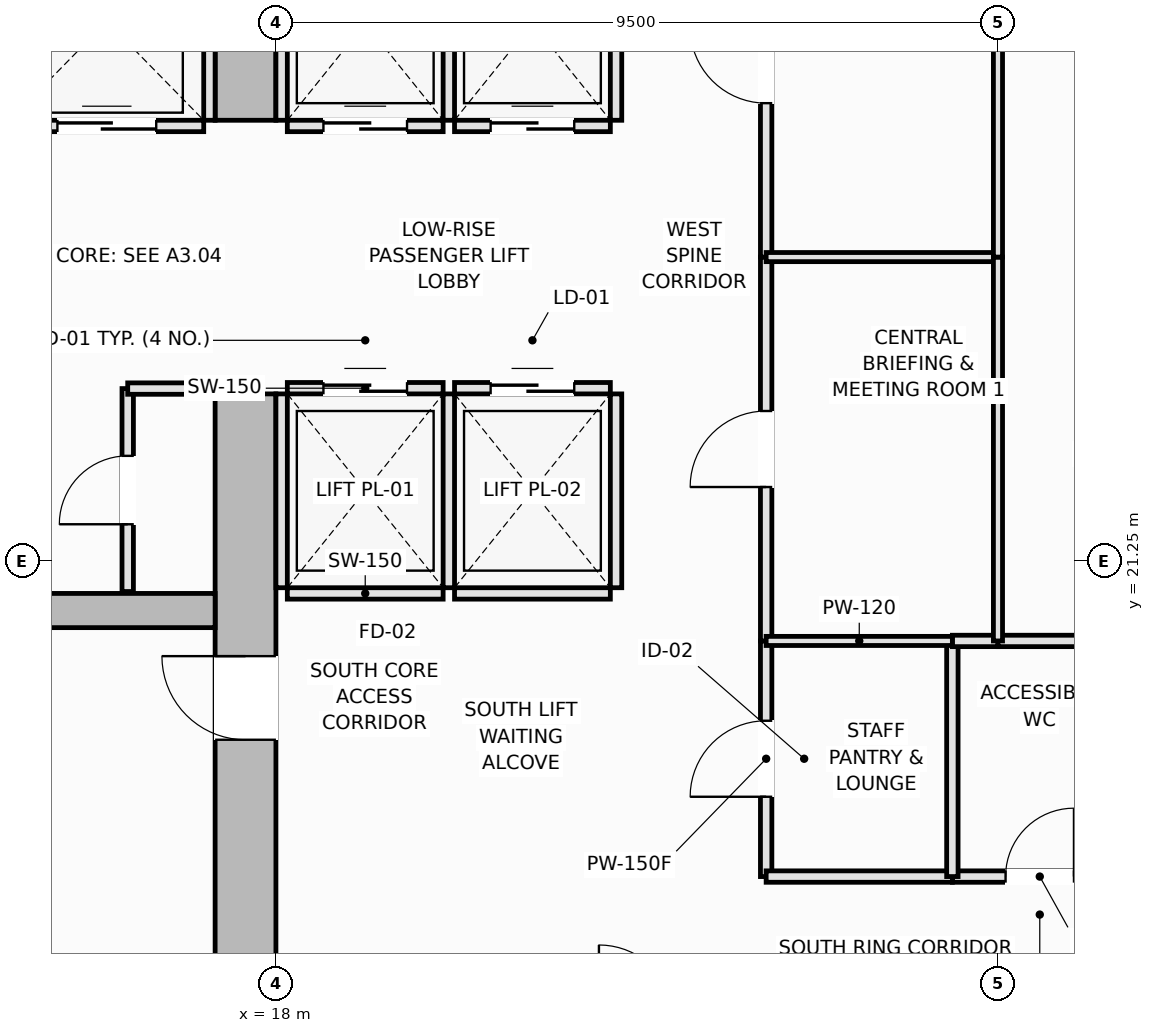
"""IFC4 building model, lengths in metres.
Left out: names, types, materials, properties, quantities, classifications, styles, units other than length and angle.
Written with IfcOpenShell. Run it as: python <this file> out.ifc"""

import sys

from ifc_helpers import new_model, si_unit, direction, frame, frame_2d, origin, place, context, subcontext, project, spatial, rectangle, extrude, element, fill, save


model = new_model("IFC4")
c1 = context("Model", 3, precision=1e-05, world=origin(), true_north=direction((0.0, 1.0)))
c2 = subcontext(c1, "Body", "Model", "MODEL_VIEW")
j1 = project(units=[si_unit("LENGTHUNIT", "METRE"), si_unit("PLANEANGLEUNIT", "RADIAN")], contexts=[c1])
p1 = place(None, origin())
s1 = spatial("IfcSite", under=j1, at=p1, CompositionType="ELEMENT")
p2 = place(p1, origin())
s2 = spatial("IfcBuilding", under=s1, at=p2, CompositionType="ELEMENT")
p3 = place(p2, frame((0.0, 0.0, 36.25)))
s3 = spatial("IfcBuildingStorey", under=s2, at=p3, CompositionType="ELEMENT", Elevation=36.25)
p4 = place(p3, frame((17.6, 14.8, 0.0), z_axis=(0.0, 0.0, 1.0), x_axis=(0.0, 1.0, 0.0)))
e1 = element("IfcWall", 1, at=p4, inside=s3, PredefinedType="SHEAR", context=c2, shape_type="SweptSolid", body=[
    extrude(rectangle(XDim=8.65, YDim=0.8, at=frame_2d((4.325, 0.0))), origin(), (0.0, 0.0, 1.0), 3.55),
])
p5 = place(p4, frame((4.1, 0.0, 0.0)))
e2 = element("IfcOpeningElement", 2, at=p5, cuts=e1, PredefinedType="OPENING", context=c2, shape_type="SweptSolid", body=[
    extrude(rectangle(XDim=1.1, YDim=2.15, at=frame_2d((0.55, 1.075))), frame((0.0, 0.41, 0.0), z_axis=(0.0, -1.0, 0.0), x_axis=(1.0, 0.0, 0.0)), (0.0, 0.0, 1.0), 0.82),
])
p6 = place(p3, frame((17.6, 27.05, 0.0), z_axis=(0.0, 0.0, 1.0), x_axis=(0.0, 1.0, 0.0)))
e3 = element("IfcWall", 3, at=p6, inside=s3, PredefinedType="SHEAR", context=c2, shape_type="SweptSolid", body=[
    extrude(rectangle(XDim=8.65, YDim=0.8, at=frame_2d((4.325, 0.0))), origin(), (0.0, 0.0, 1.0), 3.55),
])
p7 = place(p6, frame((3.45, 0.0, 0.0)))
e4 = element("IfcOpeningElement", 4, at=p7, cuts=e3, PredefinedType="OPENING", context=c2, shape_type="SweptSolid", body=[
    extrude(rectangle(XDim=1.1, YDim=2.15, at=frame_2d((0.55, 1.075))), frame((0.0, 0.41, 0.0), z_axis=(0.0, -1.0, 0.0), x_axis=(1.0, 0.0, 0.0)), (0.0, 0.0, 1.0), 0.82),
])
p8 = place(p3, frame((5.3, 20.6, 0.0), z_axis=(0.0, 0.0, 1.0), x_axis=(1.0, 0.0, 0.0)))
e5 = element("IfcWall", 5, at=p8, inside=s3, PredefinedType="SHEAR", context=c2, shape_type="SweptSolid", body=[
    extrude(rectangle(XDim=11.9, YDim=0.45, at=frame_2d((5.95, 0.0))), origin(), (0.0, 0.0, 1.0), 3.55),
])
p9 = place(p3, frame((18.15, 20.825, 0.0), z_axis=(0.0, 0.0, 1.0), x_axis=(1.0, 0.0, 0.0)))
e6 = element("IfcWall", 6, at=p9, inside=s3, PredefinedType="PARTITIONING", context=c2, shape_type="SweptSolid", body=[
    extrude(rectangle(XDim=2.05, YDim=0.15, at=frame_2d((1.025, 0.0))), origin(), (0.0, 0.0, 1.0), 3.37),
])
p10 = place(p3, frame((18.15, 23.525, 0.0), z_axis=(0.0, 0.0, 1.0), x_axis=(1.0, 0.0, 0.0)))
e7 = element("IfcWall", 7, at=p10, inside=s3, PredefinedType="PARTITIONING", context=c2, shape_type="SweptSolid", body=[
    extrude(rectangle(XDim=2.05, YDim=0.15, at=frame_2d((1.025, 0.0))), origin(), (0.0, 0.0, 1.0), 3.37),
])
p11 = place(p10, frame((0.475, 0.0, 0.0)))
e8 = element("IfcOpeningElement", 8, at=p11, cuts=e7, PredefinedType="OPENING", context=c2, shape_type="SweptSolid", body=[
    extrude(rectangle(XDim=1.1, YDim=2.2, at=frame_2d((0.55, 1.1))), frame((0.0, 0.085, 0.0), z_axis=(0.0, -1.0, 0.0), x_axis=(1.0, 0.0, 0.0)), (0.0, 0.0, 1.0), 0.17),
])
for number, where, z_axis, x_axis in (
    (9, (18.075, 20.9, 0.0), (0.0, 0.0, 1.0), (0.0, 1.0, 0.0)),
    (10, (20.275, 20.9, 0.0), (0.0, 0.0, 1.0), (0.0, 1.0, 0.0)),
):
    element("IfcWall", number, at=place(p3, frame(where, z_axis=z_axis, x_axis=x_axis)), inside=s3, PredefinedType="PARTITIONING", context=c2, shape_type="SweptSolid", body=[
        extrude(rectangle(XDim=2.55, YDim=0.15, at=frame_2d((1.275, 0.0))), origin(), (0.0, 0.0, 1.0), 3.37),
    ])
p12 = place(p3, frame((20.35, 20.825, 0.0), z_axis=(0.0, 0.0, 1.0), x_axis=(1.0, 0.0, 0.0)))
e11 = element("IfcWall", 11, at=p12, inside=s3, PredefinedType="PARTITIONING", context=c2, shape_type="SweptSolid", body=[
    extrude(rectangle(XDim=2.05, YDim=0.15, at=frame_2d((1.025, 0.0))), origin(), (0.0, 0.0, 1.0), 3.37),
])
p13 = place(p3, frame((20.35, 23.525, 0.0), z_axis=(0.0, 0.0, 1.0), x_axis=(1.0, 0.0, 0.0)))
e12 = element("IfcWall", 12, at=p13, inside=s3, PredefinedType="PARTITIONING", context=c2, shape_type="SweptSolid", body=[
    extrude(rectangle(XDim=2.05, YDim=0.15, at=frame_2d((1.025, 0.0))), origin(), (0.0, 0.0, 1.0), 3.37),
])
p14 = place(p13, frame((0.475, 0.0, 0.0)))
e13 = element("IfcOpeningElement", 13, at=p14, cuts=e12, PredefinedType="OPENING", context=c2, shape_type="SweptSolid", body=[
    extrude(rectangle(XDim=1.1, YDim=2.2, at=frame_2d((0.55, 1.1))), frame((0.0, 0.085, 0.0), z_axis=(0.0, -1.0, 0.0), x_axis=(1.0, 0.0, 0.0)), (0.0, 0.0, 1.0), 0.17),
])
p15 = place(p3, frame((22.475, 20.9, 0.0), z_axis=(0.0, 0.0, 1.0), x_axis=(0.0, 1.0, 0.0)))
e14 = element("IfcWall", 14, at=p15, inside=s3, PredefinedType="PARTITIONING", context=c2, shape_type="SweptSolid", body=[
    extrude(rectangle(XDim=2.55, YDim=0.15, at=frame_2d((1.275, 0.0))), origin(), (0.0, 0.0, 1.0), 3.37),
])
p16 = place(p3, frame((18.15, 26.975, 0.0), z_axis=(0.0, 0.0, 1.0), x_axis=(1.0, 0.0, 0.0)))
e15 = element("IfcWall", 15, at=p16, inside=s3, PredefinedType="PARTITIONING", context=c2, shape_type="SweptSolid", body=[
    extrude(rectangle(XDim=2.05, YDim=0.15, at=frame_2d((1.025, 0.0))), origin(), (0.0, 0.0, 1.0), 3.37),
])
p17 = place(p16, frame((0.475, 0.0, 0.0)))
e16 = element("IfcOpeningElement", 16, at=p17, cuts=e15, PredefinedType="OPENING", context=c2, shape_type="SweptSolid", body=[
    extrude(rectangle(XDim=1.1, YDim=2.2, at=frame_2d((0.55, 1.1))), frame((0.0, 0.085, 0.0), z_axis=(0.0, -1.0, 0.0), x_axis=(1.0, 0.0, 0.0)), (0.0, 0.0, 1.0), 0.17),
])
for number, where, z_axis, x_axis in (
    (17, (18.075, 27.05, 0.0), (0.0, 0.0, 1.0), (0.0, 1.0, 0.0)),
    (18, (20.275, 27.05, 0.0), (0.0, 0.0, 1.0), (0.0, 1.0, 0.0)),
):
    element("IfcWall", number, at=place(p3, frame(where, z_axis=z_axis, x_axis=x_axis)), inside=s3, PredefinedType="PARTITIONING", context=c2, shape_type="SweptSolid", body=[
        extrude(rectangle(XDim=2.55, YDim=0.15, at=frame_2d((1.275, 0.0))), origin(), (0.0, 0.0, 1.0), 3.37),
    ])
p18 = place(p3, frame((20.35, 26.975, 0.0), z_axis=(0.0, 0.0, 1.0), x_axis=(1.0, 0.0, 0.0)))
e19 = element("IfcWall", 19, at=p18, inside=s3, PredefinedType="PARTITIONING", context=c2, shape_type="SweptSolid", body=[
    extrude(rectangle(XDim=2.05, YDim=0.15, at=frame_2d((1.025, 0.0))), origin(), (0.0, 0.0, 1.0), 3.37),
])
p19 = place(p18, frame((0.475, 0.0, 0.0)))
e20 = element("IfcOpeningElement", 20, at=p19, cuts=e19, PredefinedType="OPENING", context=c2, shape_type="SweptSolid", body=[
    extrude(rectangle(XDim=1.1, YDim=2.2, at=frame_2d((0.55, 1.1))), frame((0.0, 0.085, 0.0), z_axis=(0.0, -1.0, 0.0), x_axis=(1.0, 0.0, 0.0)), (0.0, 0.0, 1.0), 0.17),
])
p20 = place(p3, frame((22.475, 27.05, 0.0), z_axis=(0.0, 0.0, 1.0), x_axis=(0.0, 1.0, 0.0)))
e21 = element("IfcWall", 21, at=p20, inside=s3, PredefinedType="PARTITIONING", context=c2, shape_type="SweptSolid", body=[
    extrude(rectangle(XDim=2.55, YDim=0.15, at=frame_2d((1.275, 0.0))), origin(), (0.0, 0.0, 1.0), 3.37),
])
p21 = place(p3, frame((14.5, 26.975, 0.0), z_axis=(0.0, 0.0, 1.0), x_axis=(1.0, 0.0, 0.0)))
e22 = element("IfcWall", 22, at=p21, inside=s3, PredefinedType="PARTITIONING", context=c2, shape_type="SweptSolid", body=[
    extrude(rectangle(XDim=2.55, YDim=0.15, at=frame_2d((1.275, 0.0))), origin(), (0.0, 0.0, 1.0), 3.37),
])
p22 = place(p21, frame((0.625, 0.0, 0.0)))
e23 = element("IfcOpeningElement", 23, at=p22, cuts=e22, PredefinedType="OPENING", context=c2, shape_type="SweptSolid", body=[
    extrude(rectangle(XDim=1.3, YDim=2.2, at=frame_2d((0.65, 1.1))), frame((0.0, 0.085, 0.0), z_axis=(0.0, -1.0, 0.0), x_axis=(1.0, 0.0, 0.0)), (0.0, 0.0, 1.0), 0.17),
])
p23 = place(p3, frame((17.125, 27.05, 0.0), z_axis=(0.0, 0.0, 1.0), x_axis=(0.0, 1.0, 0.0)))
e24 = element("IfcWall", 24, at=p23, inside=s3, PredefinedType="PARTITIONING", context=c2, shape_type="SweptSolid", body=[
    extrude(rectangle(XDim=2.6, YDim=0.15, at=frame_2d((1.3, 0.0))), origin(), (0.0, 0.0, 1.0), 3.37),
])
p24 = place(p3, frame((16.05, 20.85, 0.0), z_axis=(0.0, 0.0, 1.0), x_axis=(0.0, 1.0, 0.0)))
e25 = element("IfcWall", 25, at=p24, inside=s3, PredefinedType="PARTITIONING", context=c2, shape_type="SweptSolid", body=[
    extrude(rectangle(XDim=2.67, YDim=0.15, at=frame_2d((1.335, 0.0))), origin(), (0.0, 0.0, 1.0), 3.37),
])
p25 = place(p24, frame((0.885, 0.0, 0.0)))
e26 = element("IfcOpeningElement", 26, at=p25, cuts=e25, PredefinedType="OPENING", context=c2, shape_type="SweptSolid", body=[
    extrude(rectangle(XDim=0.9, YDim=2.1, at=frame_2d((0.45, 1.05))), frame((0.0, 0.085, 0.0), z_axis=(0.0, -1.0, 0.0), x_axis=(1.0, 0.0, 0.0)), (0.0, 0.0, 1.0), 0.17),
])
p26 = place(p3, frame((16.05, 23.52, 0.0), z_axis=(0.0, 0.0, 1.0), x_axis=(1.0, 0.0, 0.0)))
e27 = element("IfcWall", 27, at=p26, inside=s3, PredefinedType="PARTITIONING", context=c2, shape_type="SweptSolid", body=[
    extrude(rectangle(XDim=1.17, YDim=0.15, at=frame_2d((0.585, 0.0))), origin(), (0.0, 0.0, 1.0), 3.37),
])
p27 = place(p3, frame((24.45, 17.1, 0.0), z_axis=(0.0, 0.0, 1.0), x_axis=(0.0, 1.0, 0.0)))
e28 = element("IfcWall", 28, at=p27, inside=s3, PredefinedType="PARTITIONING", context=c2, shape_type="SweptSolid", body=[
    extrude(rectangle(XDim=3.1, YDim=0.15, at=frame_2d((1.55, 0.0))), origin(), (0.0, 0.0, 1.0), 3.37),
])
p28 = place(p27, frame((1.05, 0.0, 0.0)))
e29 = element("IfcOpeningElement", 29, at=p28, cuts=e28, PredefinedType="OPENING", context=c2, shape_type="SweptSolid", body=[
    extrude(rectangle(XDim=1.0, YDim=2.15, at=frame_2d((0.5, 1.075))), frame((0.0, 0.085, 0.0), z_axis=(0.0, -1.0, 0.0), x_axis=(1.0, 0.0, 0.0)), (0.0, 0.0, 1.0), 0.17),
])
p29 = place(p3, frame((24.45, 20.2, 0.0), z_axis=(0.0, 0.0, 1.0), x_axis=(0.0, 1.0, 0.0)))
e30 = element("IfcWall", 30, at=p29, inside=s3, PredefinedType="PARTITIONING", context=c2, shape_type="SweptSolid", body=[
    extrude(rectangle(XDim=5.05, YDim=0.15, at=frame_2d((2.525, 0.0))), origin(), (0.0, 0.0, 1.0), 3.37),
])
p30 = place(p29, frame((2.025, 0.0, 0.0)))
e31 = element("IfcOpeningElement", 31, at=p30, cuts=e30, PredefinedType="OPENING", context=c2, shape_type="SweptSolid", body=[
    extrude(rectangle(XDim=1.0, YDim=2.15, at=frame_2d((0.5, 1.075))), frame((0.0, 0.085, 0.0), z_axis=(0.0, -1.0, 0.0), x_axis=(1.0, 0.0, 0.0)), (0.0, 0.0, 1.0), 0.17),
])
p31 = place(p3, frame((24.45, 25.25, 0.0), z_axis=(0.0, 0.0, 1.0), x_axis=(0.0, 1.0, 0.0)))
e32 = element("IfcWall", 32, at=p31, inside=s3, PredefinedType="PARTITIONING", context=c2, shape_type="SweptSolid", body=[
    extrude(rectangle(XDim=5.05, YDim=0.15, at=frame_2d((2.525, 0.0))), origin(), (0.0, 0.0, 1.0), 3.37),
])
p32 = place(p31, frame((2.025, 0.0, 0.0)))
e33 = element("IfcOpeningElement", 33, at=p32, cuts=e32, PredefinedType="OPENING", context=c2, shape_type="SweptSolid", body=[
    extrude(rectangle(XDim=1.0, YDim=2.15, at=frame_2d((0.5, 1.075))), frame((0.0, 0.085, 0.0), z_axis=(0.0, -1.0, 0.0), x_axis=(1.0, 0.0, 0.0)), (0.0, 0.0, 1.0), 0.17),
])
p33 = place(p3, frame((26.9, 17.1, 0.0), z_axis=(0.0, 0.0, 1.0), x_axis=(1.0, 0.0, 0.0)))
e34 = element("IfcWall", 34, at=p33, inside=s3, PredefinedType="PLUMBINGWALL", context=c2, shape_type="SweptSolid", body=[
    extrude(rectangle(XDim=2.3, YDim=0.15, at=frame_2d((1.15, 0.0))), origin(), (0.0, 0.0, 1.0), 3.37),
])
p34 = place(p33, frame((0.7, 0.0, 0.0)))
e35 = element("IfcOpeningElement", 35, at=p34, cuts=e34, PredefinedType="OPENING", context=c2, shape_type="SweptSolid", body=[
    extrude(rectangle(XDim=0.9, YDim=2.1, at=frame_2d((0.45, 1.05))), frame((0.0, 0.085, 0.0), z_axis=(0.0, -1.0, 0.0), x_axis=(1.0, 0.0, 0.0)), (0.0, 0.0, 1.0), 0.17),
])
p35 = place(p3, frame((24.45, 17.1, 0.0), z_axis=(0.0, 0.0, 1.0), x_axis=(1.0, 0.0, 0.0)))
e36 = element("IfcWall", 36, at=p35, inside=s3, PredefinedType="PARTITIONING", context=c2, shape_type="SweptSolid", body=[
    extrude(rectangle(XDim=2.45, YDim=0.15, at=frame_2d((1.225, 0.0))), origin(), (0.0, 0.0, 1.0), 3.37),
])
p36 = place(p3, frame((26.9, 17.1, 0.0), z_axis=(0.0, 0.0, 1.0), x_axis=(0.0, 1.0, 0.0)))
e37 = element("IfcWall", 37, at=p36, inside=s3, PredefinedType="PLUMBINGWALL", context=c2, shape_type="SweptSolid", body=[
    extrude(rectangle(XDim=3.1, YDim=0.15, at=frame_2d((1.55, 0.0))), origin(), (0.0, 0.0, 1.0), 3.37),
])
p37 = place(p3, frame((26.9, 20.2, 0.0), z_axis=(0.0, 0.0, 1.0), x_axis=(1.0, 0.0, 0.0)))
e38 = element("IfcWall", 38, at=p37, inside=s3, PredefinedType="PLUMBINGWALL", context=c2, shape_type="SweptSolid", body=[
    extrude(rectangle(XDim=0.6, YDim=0.15, at=frame_2d((0.3, 0.0))), origin(), (0.0, 0.0, 1.0), 3.37),
])
p38 = place(p3, frame((27.5, 20.2, 0.0), z_axis=(0.0, 0.0, 1.0), x_axis=(1.0, 0.0, 0.0)))
e39 = element("IfcWall", 39, at=p38, inside=s3, PredefinedType="PLUMBINGWALL", context=c2, shape_type="SweptSolid", body=[
    extrude(rectangle(XDim=1.7, YDim=0.15, at=frame_2d((0.85, 0.0))), origin(), (0.0, 0.0, 1.0), 3.37),
])
p39 = place(p3, frame((24.45, 20.2, 0.0), z_axis=(0.0, 0.0, 1.0), x_axis=(1.0, 0.0, 0.0)))
e40 = element("IfcWall", 40, at=p39, inside=s3, PredefinedType="PARTITIONING", context=c2, shape_type="SweptSolid", body=[
    extrude(rectangle(XDim=2.45, YDim=0.12, at=frame_2d((1.225, 0.0))), origin(), (0.0, 0.0, 1.0), 3.37),
])
p40 = place(p3, frame((24.45, 25.25, 0.0), z_axis=(0.0, 0.0, 1.0), x_axis=(1.0, 0.0, 0.0)))
e41 = element("IfcWall", 41, at=p40, inside=s3, PredefinedType="PARTITIONING", context=c2, shape_type="SweptSolid", body=[
    extrude(rectangle(XDim=3.05, YDim=0.12, at=frame_2d((1.525, 0.0))), origin(), (0.0, 0.0, 1.0), 2.72),
])
for number, where, z_axis, x_axis in (
    (42, (27.5, 20.2, 0.0), (0.0, 0.0, 1.0), (0.0, 1.0, 0.0)),
    (43, (27.5, 25.25, 0.0), (0.0, 0.0, 1.0), (0.0, 1.0, 0.0)),
):
    element("IfcWall", number, at=place(p3, frame(where, z_axis=z_axis, x_axis=x_axis)), inside=s3, PredefinedType="PARTITIONING", context=c2, shape_type="SweptSolid", body=[
        extrude(rectangle(XDim=5.05, YDim=0.12, at=frame_2d((2.525, 0.0))), origin(), (0.0, 0.0, 1.0), 3.37),
    ])
p41 = place(p11, origin())
e44 = element("IfcDoor", 44, at=p41, inside=s3, OperationType="DOUBLE_DOOR_SLIDING", PredefinedType="DOOR", context=c2, shape_type="SweptSolid", body=[
    extrude(rectangle(XDim=1.1, YDim=2.2, at=frame_2d((0.55, 1.1))), frame((0.0, 0.025, 0.0), z_axis=(0.0, -1.0, 0.0), x_axis=(1.0, 0.0, 0.0)), (0.0, 0.0, 1.0), 0.05),
])
fill(e8, e44)
p42 = place(p14, origin())
e45 = element("IfcDoor", 45, at=p42, inside=s3, OperationType="DOUBLE_DOOR_SLIDING", PredefinedType="DOOR", context=c2, shape_type="SweptSolid", body=[
    extrude(rectangle(XDim=1.1, YDim=2.2, at=frame_2d((0.55, 1.1))), frame((0.0, 0.025, 0.0), z_axis=(0.0, -1.0, 0.0), x_axis=(1.0, 0.0, 0.0)), (0.0, 0.0, 1.0), 0.05),
])
fill(e13, e45)
p43 = place(p17, origin())
e46 = element("IfcDoor", 46, at=p43, inside=s3, OperationType="DOUBLE_DOOR_SLIDING", PredefinedType="DOOR", context=c2, shape_type="SweptSolid", body=[
    extrude(rectangle(XDim=1.1, YDim=2.2, at=frame_2d((0.55, 1.1))), frame((0.0, 0.025, 0.0), z_axis=(0.0, -1.0, 0.0), x_axis=(1.0, 0.0, 0.0)), (0.0, 0.0, 1.0), 0.05),
])
fill(e16, e46)
p44 = place(p19, origin())
e47 = element("IfcDoor", 47, at=p44, inside=s3, OperationType="DOUBLE_DOOR_SLIDING", PredefinedType="DOOR", context=c2, shape_type="SweptSolid", body=[
    extrude(rectangle(XDim=1.1, YDim=2.2, at=frame_2d((0.55, 1.1))), frame((0.0, 0.025, 0.0), z_axis=(0.0, -1.0, 0.0), x_axis=(1.0, 0.0, 0.0)), (0.0, 0.0, 1.0), 0.05),
])
fill(e20, e47)
p45 = place(p22, origin())
e48 = element("IfcDoor", 48, at=p45, inside=s3, OperationType="DOUBLE_DOOR_SLIDING", PredefinedType="DOOR", context=c2, shape_type="SweptSolid", body=[
    extrude(rectangle(XDim=1.3, YDim=2.2, at=frame_2d((0.65, 1.1))), frame((0.0, 0.025, 0.0), z_axis=(0.0, -1.0, 0.0), x_axis=(1.0, 0.0, 0.0)), (0.0, 0.0, 1.0), 0.05),
])
fill(e23, e48)
p46 = place(p5, origin())
e49 = element("IfcDoor", 49, at=p46, inside=s3, OperationType="SINGLE_SWING_RIGHT", PredefinedType="DOOR", context=c2, shape_type="SweptSolid", body=[
    extrude(rectangle(XDim=1.1, YDim=2.15, at=frame_2d((0.55, 1.075))), frame((0.0, 0.025, 0.0), z_axis=(0.0, -1.0, 0.0), x_axis=(1.0, 0.0, 0.0)), (0.0, 0.0, 1.0), 0.05),
])
fill(e2, e49)
p47 = place(p25, origin())
e50 = element("IfcDoor", 50, at=p47, inside=s3, OperationType="SINGLE_SWING_LEFT", PredefinedType="DOOR", context=c2, shape_type="SweptSolid", body=[
    extrude(rectangle(XDim=0.9, YDim=2.1, at=frame_2d((0.45, 1.05))), frame((0.0, 0.025, 0.0), z_axis=(0.0, -1.0, 0.0), x_axis=(1.0, 0.0, 0.0)), (0.0, 0.0, 1.0), 0.05),
])
fill(e26, e50)
p48 = place(p28, origin())
e51 = element("IfcDoor", 51, at=p48, inside=s3, OperationType="SINGLE_SWING_LEFT", PredefinedType="DOOR", context=c2, shape_type="SweptSolid", body=[
    extrude(rectangle(XDim=1.0, YDim=2.15, at=frame_2d((0.5, 1.075))), frame((0.0, 0.025, 0.0), z_axis=(0.0, -1.0, 0.0), x_axis=(1.0, 0.0, 0.0)), (0.0, 0.0, 1.0), 0.05),
])
fill(e29, e51)
p49 = place(p30, origin())
e52 = element("IfcDoor", 52, at=p49, inside=s3, OperationType="SINGLE_SWING_LEFT", PredefinedType="DOOR", context=c2, shape_type="SweptSolid", body=[
    extrude(rectangle(XDim=1.0, YDim=2.15, at=frame_2d((0.5, 1.075))), frame((0.0, 0.025, 0.0), z_axis=(0.0, -1.0, 0.0), x_axis=(1.0, 0.0, 0.0)), (0.0, 0.0, 1.0), 0.05),
])
fill(e31, e52)
p50 = place(p32, origin())
e53 = element("IfcDoor", 53, at=p50, inside=s3, OperationType="SINGLE_SWING_RIGHT", PredefinedType="DOOR", context=c2, shape_type="SweptSolid", body=[
    extrude(rectangle(XDim=1.0, YDim=2.15, at=frame_2d((0.5, 1.075))), frame((0.0, 0.025, 0.0), z_axis=(0.0, -1.0, 0.0), x_axis=(1.0, 0.0, 0.0)), (0.0, 0.0, 1.0), 0.05),
])
fill(e33, e53)
p51 = place(p34, origin())
e54 = element("IfcDoor", 54, at=p51, inside=s3, OperationType="SINGLE_SWING_RIGHT", PredefinedType="DOOR", context=c2, shape_type="SweptSolid", body=[
    extrude(rectangle(XDim=0.9, YDim=2.1, at=frame_2d((0.45, 1.05))), frame((0.0, 0.025, 0.0), z_axis=(0.0, -1.0, 0.0), x_axis=(1.0, 0.0, 0.0)), (0.0, 0.0, 1.0), 0.05),
])
fill(e35, e54)
save(model, sys.argv[1])
